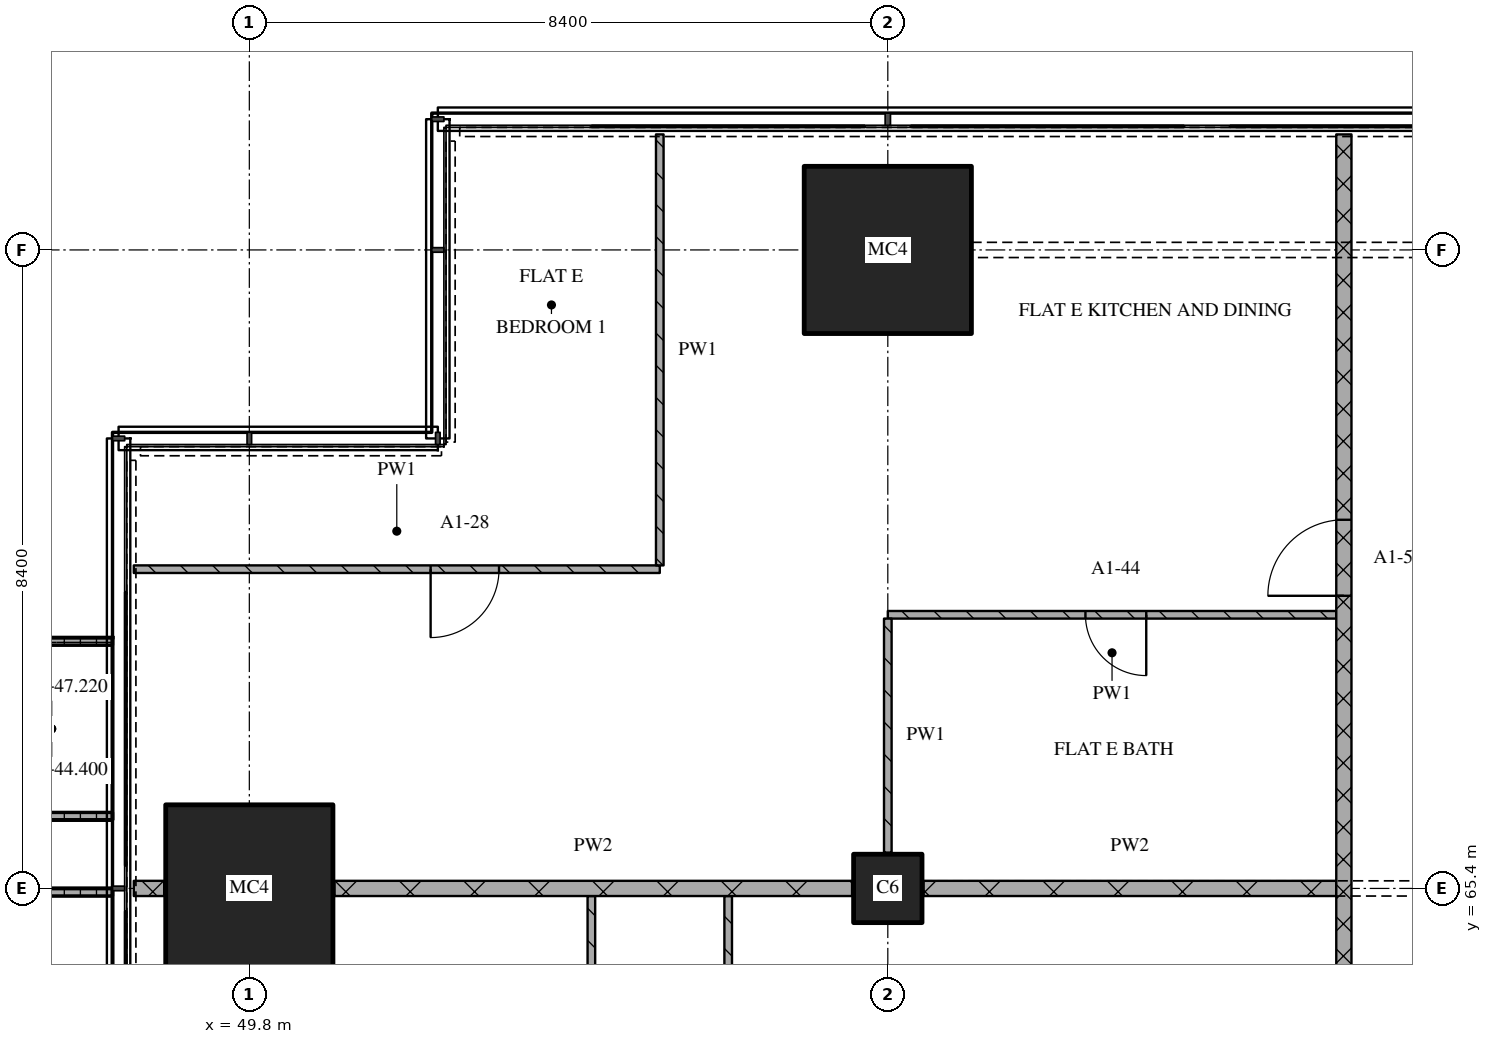
"""IFC4 building model, lengths in metres.
Left out: names, types, materials, properties, quantities, classifications, styles, units other than length and angle.
Written with IfcOpenShell. Run it as: python <this file> out.ifc"""

import sys

from ifc_helpers import new_model, si_unit, direction, frame, frame_2d, origin, origin_2d, place, context, subcontext, project, spatial, polyline, rectangle, outline, extrude, element, fill, save


model = new_model("IFC4")
c1 = context("Model", 3, precision=1e-05, world=origin(), true_north=direction((0.0, 1.0)))
c2 = subcontext(c1, "Body", "Model", "MODEL_VIEW")
j1 = project(units=[si_unit("LENGTHUNIT", "METRE"), si_unit("PLANEANGLEUNIT", "RADIAN")], contexts=[c1])
p1 = place(None, origin())
s1 = spatial("IfcSite", under=j1, at=p1, CompositionType="ELEMENT")
p2 = place(p1, origin())
s2 = spatial("IfcBuilding", under=s1, at=p2, CompositionType="ELEMENT")
p3 = place(p2, frame((0.0, 0.0, 44.4)))
s3 = spatial("IfcBuildingStorey", under=s2, at=p3, CompositionType="ELEMENT", Elevation=44.4)
p4 = place(p3, frame((49.8, 65.4, 0.0), z_axis=(0.0, 0.0, 1.0), x_axis=(1.0, 0.0, 0.0)))
e1 = element("IfcColumn", 1, at=p4, inside=s3, PredefinedType="COLUMN", context=c2, shape_type="SweptSolid", body=[
    extrude(rectangle(XDim=2.2, YDim=2.2, at=origin_2d()), origin(), (0.0, 0.0, 1.0), 3.6),
])
p5 = place(p3, frame((58.2, 65.4, 0.0), z_axis=(0.0, 0.0, 1.0), x_axis=(1.0, 0.0, 0.0)))
e2 = element("IfcColumn", 2, at=p5, inside=s3, PredefinedType="COLUMN", context=c2, shape_type="SweptSolid", body=[
    extrude(rectangle(XDim=0.9, YDim=0.9, at=origin_2d()), origin(), (0.0, 0.0, 1.0), 3.6),
])
p6 = place(p3, frame((58.2, 73.8, 0.0), z_axis=(0.0, 0.0, 1.0), x_axis=(1.0, 0.0, 0.0)))
e3 = element("IfcColumn", 3, at=p6, inside=s3, PredefinedType="COLUMN", context=c2, shape_type="SweptSolid", body=[
    extrude(rectangle(XDim=2.2, YDim=2.2, at=origin_2d()), origin(), (0.0, 0.0, 1.0), 3.6),
])
p7 = place(p3, origin())
e4 = element("IfcWall", 4, at=p7, inside=s3, PredefinedType="SOLIDWALL", context=c2, shape_type="SweptSolid", body=[
    extrude(outline(polyline([(48.0, 68.7), (48.0, 68.6), (46.5, 68.6), (46.5, 66.4), (48.0, 66.4), (48.0, 66.3), (46.4, 66.3), (46.4, 68.7), (48.0, 68.7)])), origin(), (0.0, 0.0, 1.0), 1.0),
])
p8 = place(p3, origin())
e5 = element("IfcWall", 5, at=p8, inside=s3, PredefinedType="SOLIDWALL", context=c2, shape_type="SweptSolid", body=[
    extrude(outline(polyline([(48.0, 65.4), (48.0, 65.3), (46.367, 65.3), (46.367, 61.3), (48.0, 61.3), (48.0, 61.2), (46.267, 61.2), (46.267, 65.4), (48.0, 65.4)])), origin(), (0.0, 0.0, 1.0), 1.0),
])
p9 = place(p3, frame((48.28, 65.4, 0.0), z_axis=(0.0, 0.0, 1.0), x_axis=(1.0, 0.0, 0.0)))
e6 = element("IfcWall", 6, at=p9, inside=s3, PredefinedType="PARTITIONING", context=c2, shape_type="SweptSolid", body=[
    extrude(rectangle(XDim=0.4, YDim=0.2, at=frame_2d((0.2, 0.0))), origin(), (0.0, 0.0, 1.0), 3.32),
])
p10 = place(p3, frame((50.92, 65.4, 0.0), z_axis=(0.0, 0.0, 1.0), x_axis=(1.0, 0.0, 0.0)))
e7 = element("IfcWall", 7, at=p10, inside=s3, PredefinedType="PARTITIONING", context=c2, shape_type="SweptSolid", body=[
    extrude(rectangle(XDim=6.81, YDim=0.2, at=frame_2d((3.405, 0.0))), origin(), (0.0, 0.0, 1.0), 3.32),
])
p11 = place(p3, frame((58.67, 65.4, 0.0), z_axis=(0.0, 0.0, 1.0), x_axis=(1.0, 0.0, 0.0)))
e8 = element("IfcWall", 8, at=p11, inside=s3, PredefinedType="PARTITIONING", context=c2, shape_type="SweptSolid", body=[
    extrude(rectangle(XDim=5.43, YDim=0.2, at=frame_2d((2.715, 0.0))), origin(), (0.0, 0.0, 1.0), 2.82),
])
p12 = place(p3, frame((64.1, 69.0, 0.0), z_axis=(0.0, 0.0, 1.0), x_axis=(-1.0, 0.0, 0.0)))
e9 = element("IfcWall", 9, at=p12, inside=s3, PredefinedType="PARTITIONING", context=c2, shape_type="SweptSolid", body=[
    extrude(rectangle(XDim=5.9, YDim=0.1, at=frame_2d((2.95, 0.0))), origin(), (0.0, 0.0, 1.0), 3.32),
])
p13 = place(p12, frame((2.5, 0.0, 0.0)))
e10 = element("IfcOpeningElement", 10, at=p13, cuts=e9, PredefinedType="OPENING", context=c2, shape_type="SweptSolid", body=[
    extrude(rectangle(XDim=0.8, YDim=2.1, at=frame_2d((0.4, 1.05))), frame((0.0, 0.06, 0.0), z_axis=(0.0, -1.0, 0.0), x_axis=(1.0, 0.0, 0.0)), (0.0, 0.0, 1.0), 0.12),
])
p14 = place(p3, frame((48.28, 69.6, 0.0), z_axis=(0.0, 0.0, 1.0), x_axis=(1.0, 0.0, 0.0)))
e11 = element("IfcWall", 11, at=p14, inside=s3, PredefinedType="PARTITIONING", context=c2, shape_type="SweptSolid", body=[
    extrude(rectangle(XDim=6.92, YDim=0.1, at=frame_2d((3.46, 0.0))), origin(), (0.0, 0.0, 1.0), 3.32),
])
p15 = place(p14, frame((3.905, 0.0, 0.0)))
e12 = element("IfcOpeningElement", 12, at=p15, cuts=e11, PredefinedType="OPENING", context=c2, shape_type="SweptSolid", body=[
    extrude(rectangle(XDim=0.9, YDim=2.1, at=frame_2d((0.45, 1.05))), frame((0.0, 0.06, 0.0), z_axis=(0.0, -1.0, 0.0), x_axis=(1.0, 0.0, 0.0)), (0.0, 0.0, 1.0), 0.12),
])
p16 = place(p3, frame((54.3, 52.85, 0.0), z_axis=(0.0, 0.0, 1.0), x_axis=(0.0, 1.0, 0.0)))
e13 = element("IfcWall", 13, at=p16, inside=s3, PredefinedType="PARTITIONING", context=c2, shape_type="SweptSolid", body=[
    extrude(rectangle(XDim=12.45, YDim=0.1, at=frame_2d((6.225, 0.0))), origin(), (0.0, 0.0, 1.0), 3.32),
])
p17 = place(p16, frame((10.0, 0.0, 0.0)))
e14 = element("IfcOpeningElement", 14, at=p17, cuts=e13, PredefinedType="OPENING", context=c2, shape_type="SweptSolid", body=[
    extrude(rectangle(XDim=0.9, YDim=2.1, at=frame_2d((0.45, 1.05))), frame((0.0, 0.06, 0.0), z_axis=(0.0, -1.0, 0.0), x_axis=(1.0, 0.0, 0.0)), (0.0, 0.0, 1.0), 0.12),
])
p18 = place(p3, frame((55.2, 75.32, 0.0), z_axis=(0.0, 0.0, 1.0), x_axis=(0.0, -1.0, 0.0)))
e15 = element("IfcWall", 15, at=p18, inside=s3, PredefinedType="PARTITIONING", context=c2, shape_type="SweptSolid", body=[
    extrude(rectangle(XDim=5.67, YDim=0.1, at=frame_2d((2.835, 0.0))), origin(), (0.0, 0.0, 1.0), 3.32),
])
p19 = place(p3, frame((56.1, 65.3, 0.0), z_axis=(0.0, 0.0, 1.0), x_axis=(0.0, -1.0, 0.0)))
e16 = element("IfcWall", 16, at=p19, inside=s3, PredefinedType="PARTITIONING", context=c2, shape_type="SweptSolid", body=[
    extrude(rectangle(XDim=7.088, YDim=0.1, at=frame_2d((3.544, 0.0))), origin(), (0.0, 0.0, 1.0), 3.32),
])
p20 = place(p19, frame((3.069, 0.0, 0.0)))
e17 = element("IfcOpeningElement", 17, at=p20, cuts=e16, PredefinedType="OPENING", context=c2, shape_type="SweptSolid", body=[
    extrude(rectangle(XDim=0.9, YDim=2.1, at=frame_2d((0.45, 1.05))), frame((0.0, 0.06, 0.0), z_axis=(0.0, -1.0, 0.0), x_axis=(1.0, 0.0, 0.0)), (0.0, 0.0, 1.0), 0.12),
])
p21 = place(p3, frame((58.2, 68.95, 0.0), z_axis=(0.0, 0.0, 1.0), x_axis=(0.0, -1.0, 0.0)))
e18 = element("IfcWall", 18, at=p21, inside=s3, PredefinedType="PARTITIONING", context=c2, shape_type="SweptSolid", body=[
    extrude(rectangle(XDim=3.08, YDim=0.1, at=frame_2d((1.54, 0.0))), origin(), (0.0, 0.0, 1.0), 3.32),
])
p22 = place(p3, frame((64.2, 43.3, 0.0), z_axis=(0.0, 0.0, 1.0), x_axis=(0.0, 1.0, 0.0)))
e19 = element("IfcWall", 19, at=p22, inside=s3, PredefinedType="PARTITIONING", context=c2, shape_type="SweptSolid", body=[
    extrude(rectangle(XDim=32.02, YDim=0.2, at=frame_2d((16.01, 0.0))), origin(), (0.0, 0.0, 1.0), 3.32),
])
p23 = place(p22, frame((8.55, 0.0, 0.0)))
e20 = element("IfcOpeningElement", 20, at=p23, cuts=e19, PredefinedType="OPENING", context=c2, shape_type="SweptSolid", body=[
    extrude(rectangle(XDim=1.0, YDim=2.1, at=frame_2d((0.5, 1.05))), frame((0.0, 0.11, 0.0), z_axis=(0.0, -1.0, 0.0), x_axis=(1.0, 0.0, 0.0)), (0.0, 0.0, 1.0), 0.22),
])
p24 = place(p22, frame((25.95, 0.0, 0.0)))
e21 = element("IfcOpeningElement", 21, at=p24, cuts=e19, PredefinedType="OPENING", context=c2, shape_type="SweptSolid", body=[
    extrude(rectangle(XDim=1.0, YDim=2.1, at=frame_2d((0.5, 1.05))), frame((0.0, 0.11, 0.0), z_axis=(0.0, -1.0, 0.0), x_axis=(1.0, 0.0, 0.0)), (0.0, 0.0, 1.0), 0.22),
])
p25 = place(p13, origin())
e22 = element("IfcDoor", 22, at=p25, inside=s3, OperationType="SINGLE_SWING_LEFT", PredefinedType="DOOR", context=c2, shape_type="SweptSolid", body=[
    extrude(rectangle(XDim=0.8, YDim=2.1, at=frame_2d((0.4, 1.05))), frame((0.0, 0.025, 0.0), z_axis=(0.0, -1.0, 0.0), x_axis=(1.0, 0.0, 0.0)), (0.0, 0.0, 1.0), 0.05),
])
fill(e10, e22)
p26 = place(p15, origin())
e23 = element("IfcDoor", 23, at=p26, inside=s3, OperationType="SINGLE_SWING_RIGHT", PredefinedType="DOOR", context=c2, shape_type="SweptSolid", body=[
    extrude(rectangle(XDim=0.9, YDim=2.1, at=frame_2d((0.45, 1.05))), frame((0.0, 0.025, 0.0), z_axis=(0.0, -1.0, 0.0), x_axis=(1.0, 0.0, 0.0)), (0.0, 0.0, 1.0), 0.05),
])
fill(e12, e23)
p27 = place(p24, origin())
e24 = element("IfcDoor", 24, at=p27, inside=s3, OperationType="SINGLE_SWING_LEFT", PredefinedType="DOOR", context=c2, shape_type="SweptSolid", body=[
    extrude(rectangle(XDim=1.0, YDim=2.1, at=frame_2d((0.5, 1.05))), frame((0.0, 0.025, 0.0), z_axis=(0.0, -1.0, 0.0), x_axis=(1.0, 0.0, 0.0)), (0.0, 0.0, 1.0), 0.05),
])
fill(e21, e24)
save(model, sys.argv[1])
